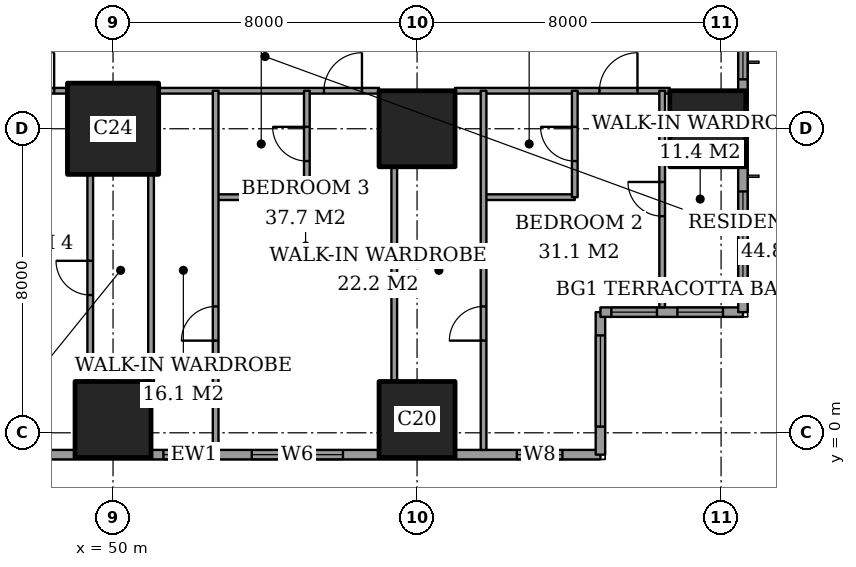
"""IFC4 building model, lengths in metres.
Left out: names, types, materials, properties, quantities, classifications, styles, units other than length and angle.
Written with IfcOpenShell. Run it as: python <this file> out.ifc"""

import sys

from ifc_helpers import new_model, si_unit, direction, frame, frame_2d, origin, origin_2d, place, context, subcontext, project, spatial, rectangle, extrude, element, fill, save


model = new_model("IFC4")
c1 = context("Model", 3, precision=1e-05, world=origin(), true_north=direction((0.0, 1.0)))
c2 = subcontext(c1, "Body", "Model", "MODEL_VIEW")
j1 = project(units=[si_unit("LENGTHUNIT", "METRE"), si_unit("PLANEANGLEUNIT", "RADIAN")], contexts=[c1])
p1 = place(None, origin())
s1 = spatial("IfcSite", under=j1, at=p1, CompositionType="ELEMENT")
p2 = place(p1, origin())
s2 = spatial("IfcBuilding", under=s1, at=p2, CompositionType="ELEMENT")
p3 = place(p2, frame((0.0, 0.0, 51.2)))
s3 = spatial("IfcBuildingStorey", under=s2, at=p3, CompositionType="ELEMENT", Elevation=51.2)
p4 = place(p3, frame((50.0, 0.35, 0.0), z_axis=(0.0, 0.0, 1.0), x_axis=(1.0, 0.0, 0.0)))
e1 = element("IfcColumn", 1, at=p4, inside=s3, PredefinedType="COLUMN", context=c2, shape_type="SweptSolid", body=[
    extrude(rectangle(XDim=2.0, YDim=2.0, at=origin_2d()), origin(), (0.0, 0.0, 1.0), 3.6),
])
p5 = place(p3, frame((50.0, 8.0, 0.0), z_axis=(0.0, 0.0, 1.0), x_axis=(1.0, 0.0, 0.0)))
e2 = element("IfcColumn", 2, at=p5, inside=s3, PredefinedType="COLUMN", context=c2, shape_type="SweptSolid", body=[
    extrude(rectangle(XDim=2.4, YDim=2.4, at=origin_2d()), origin(), (0.0, 0.0, 1.0), 3.6),
])
for number, where, z_axis, x_axis in (
    (3, (58.0, 0.35, 0.0), (0.0, 0.0, 1.0), (1.0, 0.0, 0.0)),
    (4, (58.0, 8.0, 0.0), (0.0, 0.0, 1.0), (1.0, 0.0, 0.0)),
    (5, (65.65, 8.0, 0.0), (0.0, 0.0, 1.0), (1.0, 0.0, 0.0)),
):
    element("IfcColumn", number, at=place(p3, frame(where, z_axis=z_axis, x_axis=x_axis)), inside=s3, PredefinedType="COLUMN", context=c2, shape_type="SweptSolid", body=[
        extrude(rectangle(XDim=2.0, YDim=2.0, at=origin_2d()), origin(), (0.0, 0.0, 1.0), 3.6),
    ])
p6 = place(p3, frame((41.425, -0.575, 0.0), z_axis=(0.0, 0.0, 1.0), x_axis=(1.0, 0.0, 0.0)))
e6 = element("IfcWall", 6, at=p6, inside=s3, PredefinedType="SOLIDWALL", context=c2, shape_type="SweptSolid", body=[
    extrude(rectangle(XDim=21.4, YDim=0.25, at=frame_2d((10.7, 0.0))), origin(), (0.0, 0.0, 1.0), 3.6),
])
p7 = place(p6, frame((2.3, 0.0, 0.6)))
e7 = element("IfcOpeningElement", 7, at=p7, cuts=e6, PredefinedType="OPENING", context=c2, shape_type="SweptSolid", body=[
    extrude(rectangle(XDim=1.2, YDim=2.0, at=frame_2d((0.6, 1.0))), frame((0.0, 0.135, 0.0), z_axis=(0.0, -1.0, 0.0), x_axis=(1.0, 0.0, 0.0)), (0.0, 0.0, 1.0), 0.27),
])
p8 = place(p6, frame((4.525, 0.0, 0.6)))
e8 = element("IfcOpeningElement", 8, at=p8, cuts=e6, PredefinedType="OPENING", context=c2, shape_type="SweptSolid", body=[
    extrude(rectangle(XDim=2.4, YDim=2.0, at=frame_2d((1.2, 1.0))), frame((0.0, 0.135, 0.0), z_axis=(0.0, -1.0, 0.0), x_axis=(1.0, 0.0, 0.0)), (0.0, 0.0, 1.0), 0.27),
])
p9 = place(p6, frame((9.9, 0.0, 0.6)))
e9 = element("IfcOpeningElement", 9, at=p9, cuts=e6, PredefinedType="OPENING", context=c2, shape_type="SweptSolid", body=[
    extrude(rectangle(XDim=1.2, YDim=2.0, at=frame_2d((0.6, 1.0))), frame((0.0, 0.135, 0.0), z_axis=(0.0, -1.0, 0.0), x_axis=(1.0, 0.0, 0.0)), (0.0, 0.0, 1.0), 0.27),
])
p10 = place(p6, frame((12.225, 0.0, 0.6)))
e10 = element("IfcOpeningElement", 10, at=p10, cuts=e6, PredefinedType="OPENING", context=c2, shape_type="SweptSolid", body=[
    extrude(rectangle(XDim=2.4, YDim=2.0, at=frame_2d((1.2, 1.0))), frame((0.0, 0.135, 0.0), z_axis=(0.0, -1.0, 0.0), x_axis=(1.0, 0.0, 0.0)), (0.0, 0.0, 1.0), 0.27),
])
p11 = place(p6, frame((19.2, 0.0, 0.6)))
e11 = element("IfcOpeningElement", 11, at=p11, cuts=e6, PredefinedType="OPENING", context=c2, shape_type="SweptSolid", body=[
    extrude(rectangle(XDim=1.2, YDim=2.0, at=frame_2d((0.6, 1.0))), frame((0.0, 0.135, 0.0), z_axis=(0.0, -1.0, 0.0), x_axis=(1.0, 0.0, 0.0)), (0.0, 0.0, 1.0), 0.27),
])
p12 = place(p3, frame((62.825, -0.575, 0.0), z_axis=(0.0, 0.0, 1.0), x_axis=(0.0, 1.0, 0.0)))
e12 = element("IfcWall", 12, at=p12, inside=s3, PredefinedType="SOLIDWALL", context=c2, shape_type="SweptSolid", body=[
    extrude(rectangle(XDim=3.75, YDim=0.25, at=frame_2d((1.875, 0.0))), origin(), (0.0, 0.0, 1.0), 3.6),
])
p13 = place(p12, frame((0.738, 0.0, 0.6)))
e13 = element("IfcOpeningElement", 13, at=p13, cuts=e12, PredefinedType="OPENING", context=c2, shape_type="SweptSolid", body=[
    extrude(rectangle(XDim=2.4, YDim=2.0, at=frame_2d((1.2, 1.0))), frame((0.0, 0.135, 0.0), z_axis=(0.0, -1.0, 0.0), x_axis=(1.0, 0.0, 0.0)), (0.0, 0.0, 1.0), 0.27),
])
p14 = place(p3, frame((62.825, 3.175, 0.0), z_axis=(0.0, 0.0, 1.0), x_axis=(1.0, 0.0, 0.0)))
e14 = element("IfcWall", 14, at=p14, inside=s3, PredefinedType="SOLIDWALL", context=c2, shape_type="SweptSolid", body=[
    extrude(rectangle(XDim=3.75, YDim=0.25, at=frame_2d((1.875, 0.0))), origin(), (0.0, 0.0, 1.0), 3.6),
])
p15 = place(p14, frame((0.288, 0.0, 0.6)))
e15 = element("IfcOpeningElement", 15, at=p15, cuts=e14, PredefinedType="OPENING", context=c2, shape_type="SweptSolid", body=[
    extrude(rectangle(XDim=1.2, YDim=2.0, at=frame_2d((0.6, 1.0))), frame((0.0, 0.135, 0.0), z_axis=(0.0, -1.0, 0.0), x_axis=(1.0, 0.0, 0.0)), (0.0, 0.0, 1.0), 0.27),
])
p16 = place(p14, frame((2.025, 0.0, 0.6)))
e16 = element("IfcOpeningElement", 16, at=p16, cuts=e14, PredefinedType="OPENING", context=c2, shape_type="SweptSolid", body=[
    extrude(rectangle(XDim=1.2, YDim=2.0, at=frame_2d((0.6, 1.0))), frame((0.0, 0.135, 0.0), z_axis=(0.0, -1.0, 0.0), x_axis=(1.0, 0.0, 0.0)), (0.0, 0.0, 1.0), 0.27),
])
p17 = place(p3, frame((66.575, 3.175, 0.0), z_axis=(0.0, 0.0, 1.0), x_axis=(0.0, 1.0, 0.0)))
e17 = element("IfcWall", 17, at=p17, inside=s3, PredefinedType="SOLIDWALL", context=c2, shape_type="SweptSolid", body=[
    extrude(rectangle(XDim=41.65, YDim=0.25, at=frame_2d((20.825, 0.0))), origin(), (0.0, 0.0, 1.0), 3.6),
])
p18 = place(p17, frame((0.775, 0.0, 0.6)))
e18 = element("IfcOpeningElement", 18, at=p18, cuts=e17, PredefinedType="OPENING", context=c2, shape_type="SweptSolid", body=[
    extrude(rectangle(XDim=2.4, YDim=2.0, at=frame_2d((1.2, 1.0))), frame((0.0, 0.135, 0.0), z_axis=(0.0, -1.0, 0.0), x_axis=(1.0, 0.0, 0.0)), (0.0, 0.0, 1.0), 0.27),
])
p19 = place(p17, frame((6.125, 0.0, 0.6)))
e19 = element("IfcOpeningElement", 19, at=p19, cuts=e17, PredefinedType="OPENING", context=c2, shape_type="SweptSolid", body=[
    extrude(rectangle(XDim=1.2, YDim=2.0, at=frame_2d((0.6, 1.0))), frame((0.0, 0.135, 0.0), z_axis=(0.0, -1.0, 0.0), x_axis=(1.0, 0.0, 0.0)), (0.0, 0.0, 1.0), 0.27),
])
p20 = place(p17, frame((8.375, 0.0, 0.6)))
e20 = element("IfcOpeningElement", 20, at=p20, cuts=e17, PredefinedType="OPENING", context=c2, shape_type="SweptSolid", body=[
    extrude(rectangle(XDim=2.4, YDim=2.0, at=frame_2d((1.2, 1.0))), frame((0.0, 0.135, 0.0), z_axis=(0.0, -1.0, 0.0), x_axis=(1.0, 0.0, 0.0)), (0.0, 0.0, 1.0), 0.27),
])
p21 = place(p17, frame((15.775, 0.0, 0.6)))
e21 = element("IfcOpeningElement", 21, at=p21, cuts=e17, PredefinedType="OPENING", context=c2, shape_type="SweptSolid", body=[
    extrude(rectangle(XDim=2.4, YDim=2.0, at=frame_2d((1.2, 1.0))), frame((0.0, 0.135, 0.0), z_axis=(0.0, -1.0, 0.0), x_axis=(1.0, 0.0, 0.0)), (0.0, 0.0, 1.0), 0.27),
])
p22 = place(p17, frame((23.475, 0.0, 0.6)))
e22 = element("IfcOpeningElement", 22, at=p22, cuts=e17, PredefinedType="OPENING", context=c2, shape_type="SweptSolid", body=[
    extrude(rectangle(XDim=2.4, YDim=2.0, at=frame_2d((1.2, 1.0))), frame((0.0, 0.135, 0.0), z_axis=(0.0, -1.0, 0.0), x_axis=(1.0, 0.0, 0.0)), (0.0, 0.0, 1.0), 0.27),
])
p23 = place(p17, frame((30.775, 0.0, 0.6)))
e23 = element("IfcOpeningElement", 23, at=p23, cuts=e17, PredefinedType="OPENING", context=c2, shape_type="SweptSolid", body=[
    extrude(rectangle(XDim=2.4, YDim=2.0, at=frame_2d((1.2, 1.0))), frame((0.0, 0.135, 0.0), z_axis=(0.0, -1.0, 0.0), x_axis=(1.0, 0.0, 0.0)), (0.0, 0.0, 1.0), 0.27),
])
p24 = place(p17, frame((34.125, 0.0, 0.6)))
e24 = element("IfcOpeningElement", 24, at=p24, cuts=e17, PredefinedType="OPENING", context=c2, shape_type="SweptSolid", body=[
    extrude(rectangle(XDim=1.2, YDim=2.0, at=frame_2d((0.6, 1.0))), frame((0.0, 0.135, 0.0), z_axis=(0.0, -1.0, 0.0), x_axis=(1.0, 0.0, 0.0)), (0.0, 0.0, 1.0), 0.27),
])
p25 = place(p17, frame((38.475, 0.0, 0.6)))
e25 = element("IfcOpeningElement", 25, at=p25, cuts=e17, PredefinedType="OPENING", context=c2, shape_type="SweptSolid", body=[
    extrude(rectangle(XDim=2.4, YDim=2.0, at=frame_2d((1.2, 1.0))), frame((0.0, 0.135, 0.0), z_axis=(0.0, -1.0, 0.0), x_axis=(1.0, 0.0, 0.0)), (0.0, 0.0, 1.0), 0.27),
])
p26 = place(p3, frame((52.7, 6.2, 0.0), z_axis=(0.0, 0.0, 1.0), x_axis=(1.0, 0.0, 0.0)))
e26 = element("IfcWall", 26, at=p26, inside=s3, PredefinedType="PARTITIONING", context=c2, shape_type="SweptSolid", body=[
    extrude(rectangle(XDim=2.4, YDim=0.15, at=frame_2d((1.2, 0.0))), origin(), (0.0, 0.0, 1.0), 3.35),
])
p27 = place(p3, frame((59.75, 6.2, 0.0), z_axis=(0.0, 0.0, 1.0), x_axis=(1.0, 0.0, 0.0)))
e27 = element("IfcWall", 27, at=p27, inside=s3, PredefinedType="PARTITIONING", context=c2, shape_type="SweptSolid", body=[
    extrude(rectangle(XDim=2.4, YDim=0.15, at=frame_2d((1.2, 0.0))), origin(), (0.0, 0.0, 1.0), 3.35),
])
p28 = place(p3, frame((43.35, 9.0, 0.0), z_axis=(0.0, 0.0, 1.0), x_axis=(1.0, 0.0, 0.0)))
e28 = element("IfcWall", 28, at=p28, inside=s3, PredefinedType="PARTITIONING", context=c2, shape_type="SweptSolid", body=[
    extrude(rectangle(XDim=5.45, YDim=0.15, at=frame_2d((2.725, 0.0))), origin(), (0.0, 0.0, 1.0), 3.35),
])
p29 = place(p28, frame((4.1, 0.0, 0.0)))
e29 = element("IfcOpeningElement", 29, at=p29, cuts=e28, PredefinedType="OPENING", context=c2, shape_type="SweptSolid", body=[
    extrude(rectangle(XDim=1.0, YDim=2.1, at=frame_2d((0.5, 1.05))), frame((0.0, 0.085, 0.0), z_axis=(0.0, -1.0, 0.0), x_axis=(1.0, 0.0, 0.0)), (0.0, 0.0, 1.0), 0.17),
])
p30 = place(p28, frame((0.475, 0.0, 0.0)))
e30 = element("IfcOpeningElement", 30, at=p30, cuts=e28, PredefinedType="OPENING", context=c2, shape_type="SweptSolid", body=[
    extrude(rectangle(XDim=1.0, YDim=2.1, at=frame_2d((0.5, 1.05))), frame((0.0, 0.085, 0.0), z_axis=(0.0, -1.0, 0.0), x_axis=(1.0, 0.0, 0.0)), (0.0, 0.0, 1.0), 0.17),
])
p31 = place(p3, frame((51.2, 9.0, 0.0), z_axis=(0.0, 0.0, 1.0), x_axis=(1.0, 0.0, 0.0)))
e31 = element("IfcWall", 31, at=p31, inside=s3, PredefinedType="PARTITIONING", context=c2, shape_type="SweptSolid", body=[
    extrude(rectangle(XDim=5.8, YDim=0.15, at=frame_2d((2.9, 0.0))), origin(), (0.0, 0.0, 1.0), 3.35),
])
p32 = place(p31, frame((4.35, 0.0, 0.0)))
e32 = element("IfcOpeningElement", 32, at=p32, cuts=e31, PredefinedType="OPENING", context=c2, shape_type="SweptSolid", body=[
    extrude(rectangle(XDim=1.0, YDim=2.1, at=frame_2d((0.5, 1.05))), frame((0.0, 0.085, 0.0), z_axis=(0.0, -1.0, 0.0), x_axis=(1.0, 0.0, 0.0)), (0.0, 0.0, 1.0), 0.17),
])
p33 = place(p3, frame((59.0, 9.0, 0.0), z_axis=(0.0, 0.0, 1.0), x_axis=(1.0, 0.0, 0.0)))
e33 = element("IfcWall", 33, at=p33, inside=s3, PredefinedType="PARTITIONING", context=c2, shape_type="SweptSolid", body=[
    extrude(rectangle(XDim=5.65, YDim=0.15, at=frame_2d((2.825, 0.0))), origin(), (0.0, 0.0, 1.0), 3.35),
])
p34 = place(p33, frame((3.8, 0.0, 0.0)))
e34 = element("IfcOpeningElement", 34, at=p34, cuts=e33, PredefinedType="OPENING", context=c2, shape_type="SweptSolid", body=[
    extrude(rectangle(XDim=1.0, YDim=2.1, at=frame_2d((0.5, 1.05))), frame((0.0, 0.085, 0.0), z_axis=(0.0, -1.0, 0.0), x_axis=(1.0, 0.0, 0.0)), (0.0, 0.0, 1.0), 0.17),
])
p35 = place(p3, frame((49.4, 1.35, 0.0), z_axis=(0.0, 0.0, 1.0), x_axis=(0.0, 1.0, 0.0)))
e35 = element("IfcWall", 35, at=p35, inside=s3, PredefinedType="PARTITIONING", context=c2, shape_type="SweptSolid", body=[
    extrude(rectangle(XDim=5.45, YDim=0.15, at=frame_2d((2.725, 0.0))), origin(), (0.0, 0.0, 1.0), 3.35),
])
p36 = place(p35, frame((2.275, 0.0, 0.0)))
e36 = element("IfcOpeningElement", 36, at=p36, cuts=e35, PredefinedType="OPENING", context=c2, shape_type="SweptSolid", body=[
    extrude(rectangle(XDim=0.9, YDim=2.1, at=frame_2d((0.45, 1.05))), frame((0.0, 0.085, 0.0), z_axis=(0.0, -1.0, 0.0), x_axis=(1.0, 0.0, 0.0)), (0.0, 0.0, 1.0), 0.17),
])
p37 = place(p3, frame((51.0, 1.35, 0.0), z_axis=(0.0, 0.0, 1.0), x_axis=(0.0, 1.0, 0.0)))
e37 = element("IfcWall", 37, at=p37, inside=s3, PredefinedType="PARTITIONING", context=c2, shape_type="SweptSolid", body=[
    extrude(rectangle(XDim=5.45, YDim=0.15, at=frame_2d((2.725, 0.0))), origin(), (0.0, 0.0, 1.0), 3.35),
])
p38 = place(p3, frame((52.7, -0.45, 0.0), z_axis=(0.0, 0.0, 1.0), x_axis=(0.0, 1.0, 0.0)))
e38 = element("IfcWall", 38, at=p38, inside=s3, PredefinedType="PARTITIONING", context=c2, shape_type="SweptSolid", body=[
    extrude(rectangle(XDim=9.45, YDim=0.15, at=frame_2d((4.725, 0.0))), origin(), (0.0, 0.0, 1.0), 3.35),
])
p39 = place(p38, frame((2.875, 0.0, 0.0)))
e39 = element("IfcOpeningElement", 39, at=p39, cuts=e38, PredefinedType="OPENING", context=c2, shape_type="SweptSolid", body=[
    extrude(rectangle(XDim=0.9, YDim=2.1, at=frame_2d((0.45, 1.05))), frame((0.0, 0.085, 0.0), z_axis=(0.0, -1.0, 0.0), x_axis=(1.0, 0.0, 0.0)), (0.0, 0.0, 1.0), 0.17),
])
p40 = place(p3, frame((55.1, 6.2, 0.0), z_axis=(0.0, 0.0, 1.0), x_axis=(0.0, 1.0, 0.0)))
e40 = element("IfcWall", 40, at=p40, inside=s3, PredefinedType="PARTITIONING", context=c2, shape_type="SweptSolid", body=[
    extrude(rectangle(XDim=2.8, YDim=0.15, at=frame_2d((1.4, 0.0))), origin(), (0.0, 0.0, 1.0), 3.35),
])
p41 = place(p40, frame((0.95, 0.0, 0.0)))
e41 = element("IfcOpeningElement", 41, at=p41, cuts=e40, PredefinedType="OPENING", context=c2, shape_type="SweptSolid", body=[
    extrude(rectangle(XDim=0.9, YDim=2.1, at=frame_2d((0.45, 1.05))), frame((0.0, 0.085, 0.0), z_axis=(0.0, -1.0, 0.0), x_axis=(1.0, 0.0, 0.0)), (0.0, 0.0, 1.0), 0.17),
])
p42 = place(p3, frame((57.4, 1.35, 0.0), z_axis=(0.0, 0.0, 1.0), x_axis=(0.0, 1.0, 0.0)))
e42 = element("IfcWall", 42, at=p42, inside=s3, PredefinedType="PARTITIONING", context=c2, shape_type="SweptSolid", body=[
    extrude(rectangle(XDim=5.65, YDim=0.15, at=frame_2d((2.825, 0.0))), origin(), (0.0, 0.0, 1.0), 3.35),
])
p43 = place(p3, frame((59.75, -0.45, 0.0), z_axis=(0.0, 0.0, 1.0), x_axis=(0.0, 1.0, 0.0)))
e43 = element("IfcWall", 43, at=p43, inside=s3, PredefinedType="PARTITIONING", context=c2, shape_type="SweptSolid", body=[
    extrude(rectangle(XDim=9.45, YDim=0.15, at=frame_2d((4.725, 0.0))), origin(), (0.0, 0.0, 1.0), 3.35),
])
p44 = place(p43, frame((2.875, 0.0, 0.0)))
e44 = element("IfcOpeningElement", 44, at=p44, cuts=e43, PredefinedType="OPENING", context=c2, shape_type="SweptSolid", body=[
    extrude(rectangle(XDim=0.9, YDim=2.1, at=frame_2d((0.45, 1.05))), frame((0.0, 0.085, 0.0), z_axis=(0.0, -1.0, 0.0), x_axis=(1.0, 0.0, 0.0)), (0.0, 0.0, 1.0), 0.17),
])
p45 = place(p3, frame((62.15, 6.2, 0.0), z_axis=(0.0, 0.0, 1.0), x_axis=(0.0, 1.0, 0.0)))
e45 = element("IfcWall", 45, at=p45, inside=s3, PredefinedType="PARTITIONING", context=c2, shape_type="SweptSolid", body=[
    extrude(rectangle(XDim=2.8, YDim=0.15, at=frame_2d((1.4, 0.0))), origin(), (0.0, 0.0, 1.0), 3.35),
])
p46 = place(p45, frame((0.95, 0.0, 0.0)))
e46 = element("IfcOpeningElement", 46, at=p46, cuts=e45, PredefinedType="OPENING", context=c2, shape_type="SweptSolid", body=[
    extrude(rectangle(XDim=0.9, YDim=2.1, at=frame_2d((0.45, 1.05))), frame((0.0, 0.085, 0.0), z_axis=(0.0, -1.0, 0.0), x_axis=(1.0, 0.0, 0.0)), (0.0, 0.0, 1.0), 0.17),
])
p47 = place(p3, frame((64.45, 3.3, 0.0), z_axis=(0.0, 0.0, 1.0), x_axis=(0.0, 1.0, 0.0)))
e47 = element("IfcWall", 47, at=p47, inside=s3, PredefinedType="PARTITIONING", context=c2, shape_type="SweptSolid", body=[
    extrude(rectangle(XDim=5.7, YDim=0.15, at=frame_2d((2.85, 0.0))), origin(), (0.0, 0.0, 1.0), 3.35),
])
p48 = place(p47, frame((2.4, 0.0, 0.0)))
e48 = element("IfcOpeningElement", 48, at=p48, cuts=e47, PredefinedType="OPENING", context=c2, shape_type="SweptSolid", body=[
    extrude(rectangle(XDim=0.9, YDim=2.1, at=frame_2d((0.45, 1.05))), frame((0.0, 0.085, 0.0), z_axis=(0.0, -1.0, 0.0), x_axis=(1.0, 0.0, 0.0)), (0.0, 0.0, 1.0), 0.17),
])
p49 = place(p9, origin())
e49 = element("IfcWindow", 49, at=p49, inside=s3, PartitioningType="SINGLE_PANEL", PredefinedType="WINDOW", context=c2, shape_type="SweptSolid", body=[
    extrude(rectangle(XDim=1.2, YDim=2.0, at=frame_2d((0.6, 1.0))), frame((0.0, 0.03, 0.0), z_axis=(0.0, -1.0, 0.0), x_axis=(1.0, 0.0, 0.0)), (0.0, 0.0, 1.0), 0.06),
])
fill(e9, e49)
p50 = place(p10, origin())
e50 = element("IfcWindow", 50, at=p50, inside=s3, PartitioningType="SINGLE_PANEL", PredefinedType="WINDOW", context=c2, shape_type="SweptSolid", body=[
    extrude(rectangle(XDim=2.4, YDim=2.0, at=frame_2d((1.2, 1.0))), frame((0.0, 0.03, 0.0), z_axis=(0.0, -1.0, 0.0), x_axis=(1.0, 0.0, 0.0)), (0.0, 0.0, 1.0), 0.06),
])
fill(e10, e50)
p51 = place(p11, origin())
e51 = element("IfcWindow", 51, at=p51, inside=s3, PartitioningType="SINGLE_PANEL", PredefinedType="WINDOW", context=c2, shape_type="SweptSolid", body=[
    extrude(rectangle(XDim=1.2, YDim=2.0, at=frame_2d((0.6, 1.0))), frame((0.0, 0.03, 0.0), z_axis=(0.0, -1.0, 0.0), x_axis=(1.0, 0.0, 0.0)), (0.0, 0.0, 1.0), 0.06),
])
fill(e11, e51)
p52 = place(p13, origin())
e52 = element("IfcWindow", 52, at=p52, inside=s3, PartitioningType="SINGLE_PANEL", PredefinedType="WINDOW", context=c2, shape_type="SweptSolid", body=[
    extrude(rectangle(XDim=2.4, YDim=2.0, at=frame_2d((1.2, 1.0))), frame((0.0, 0.03, 0.0), z_axis=(0.0, -1.0, 0.0), x_axis=(1.0, 0.0, 0.0)), (0.0, 0.0, 1.0), 0.06),
])
fill(e13, e52)
p53 = place(p15, origin())
e53 = element("IfcWindow", 53, at=p53, inside=s3, PartitioningType="SINGLE_PANEL", PredefinedType="WINDOW", context=c2, shape_type="SweptSolid", body=[
    extrude(rectangle(XDim=1.2, YDim=2.0, at=frame_2d((0.6, 1.0))), frame((0.0, 0.03, 0.0), z_axis=(0.0, -1.0, 0.0), x_axis=(1.0, 0.0, 0.0)), (0.0, 0.0, 1.0), 0.06),
])
fill(e15, e53)
p54 = place(p16, origin())
e54 = element("IfcWindow", 54, at=p54, inside=s3, PartitioningType="SINGLE_PANEL", PredefinedType="WINDOW", context=c2, shape_type="SweptSolid", body=[
    extrude(rectangle(XDim=1.2, YDim=2.0, at=frame_2d((0.6, 1.0))), frame((0.0, 0.03, 0.0), z_axis=(0.0, -1.0, 0.0), x_axis=(1.0, 0.0, 0.0)), (0.0, 0.0, 1.0), 0.06),
])
fill(e16, e54)
p55 = place(p18, origin())
e55 = element("IfcWindow", 55, at=p55, inside=s3, PartitioningType="SINGLE_PANEL", PredefinedType="WINDOW", context=c2, shape_type="SweptSolid", body=[
    extrude(rectangle(XDim=2.4, YDim=2.0, at=frame_2d((1.2, 1.0))), frame((0.0, 0.03, 0.0), z_axis=(0.0, -1.0, 0.0), x_axis=(1.0, 0.0, 0.0)), (0.0, 0.0, 1.0), 0.06),
])
fill(e18, e55)
p56 = place(p19, origin())
e56 = element("IfcWindow", 56, at=p56, inside=s3, PartitioningType="SINGLE_PANEL", PredefinedType="WINDOW", context=c2, shape_type="SweptSolid", body=[
    extrude(rectangle(XDim=1.2, YDim=2.0, at=frame_2d((0.6, 1.0))), frame((0.0, 0.03, 0.0), z_axis=(0.0, -1.0, 0.0), x_axis=(1.0, 0.0, 0.0)), (0.0, 0.0, 1.0), 0.06),
])
fill(e19, e56)
p57 = place(p48, origin())
e57 = element("IfcDoor", 57, at=p57, inside=s3, OperationType="SINGLE_SWING_LEFT", PredefinedType="DOOR", context=c2, shape_type="SweptSolid", body=[
    extrude(rectangle(XDim=0.9, YDim=2.1, at=frame_2d((0.45, 1.05))), frame((0.0, 0.025, 0.0), z_axis=(0.0, -1.0, 0.0), x_axis=(1.0, 0.0, 0.0)), (0.0, 0.0, 1.0), 0.05),
])
fill(e48, e57)
p58 = place(p46, origin())
e58 = element("IfcDoor", 58, at=p58, inside=s3, OperationType="SINGLE_SWING_LEFT", PredefinedType="DOOR", context=c2, shape_type="SweptSolid", body=[
    extrude(rectangle(XDim=0.9, YDim=2.1, at=frame_2d((0.45, 1.05))), frame((0.0, 0.025, 0.0), z_axis=(0.0, -1.0, 0.0), x_axis=(1.0, 0.0, 0.0)), (0.0, 0.0, 1.0), 0.05),
])
fill(e46, e58)
p59 = place(p34, origin())
e59 = element("IfcDoor", 59, at=p59, inside=s3, OperationType="SINGLE_SWING_LEFT", PredefinedType="DOOR", context=c2, shape_type="SweptSolid", body=[
    extrude(rectangle(XDim=1.0, YDim=2.1, at=frame_2d((0.5, 1.05))), frame((0.0, 0.025, 0.0), z_axis=(0.0, -1.0, 0.0), x_axis=(1.0, 0.0, 0.0)), (0.0, 0.0, 1.0), 0.05),
])
fill(e34, e59)
p60 = place(p44, origin())
e60 = element("IfcDoor", 60, at=p60, inside=s3, OperationType="SINGLE_SWING_RIGHT", PredefinedType="DOOR", context=c2, shape_type="SweptSolid", body=[
    extrude(rectangle(XDim=0.9, YDim=2.1, at=frame_2d((0.45, 1.05))), frame((0.0, 0.025, 0.0), z_axis=(0.0, -1.0, 0.0), x_axis=(1.0, 0.0, 0.0)), (0.0, 0.0, 1.0), 0.05),
])
fill(e44, e60)
p61 = place(p41, origin())
e61 = element("IfcDoor", 61, at=p61, inside=s3, OperationType="SINGLE_SWING_LEFT", PredefinedType="DOOR", context=c2, shape_type="SweptSolid", body=[
    extrude(rectangle(XDim=0.9, YDim=2.1, at=frame_2d((0.45, 1.05))), frame((0.0, 0.025, 0.0), z_axis=(0.0, -1.0, 0.0), x_axis=(1.0, 0.0, 0.0)), (0.0, 0.0, 1.0), 0.05),
])
fill(e41, e61)
p62 = place(p32, origin())
e62 = element("IfcDoor", 62, at=p62, inside=s3, OperationType="SINGLE_SWING_LEFT", PredefinedType="DOOR", context=c2, shape_type="SweptSolid", body=[
    extrude(rectangle(XDim=1.0, YDim=2.1, at=frame_2d((0.5, 1.05))), frame((0.0, 0.025, 0.0), z_axis=(0.0, -1.0, 0.0), x_axis=(1.0, 0.0, 0.0)), (0.0, 0.0, 1.0), 0.05),
])
fill(e32, e62)
p63 = place(p39, origin())
e63 = element("IfcDoor", 63, at=p63, inside=s3, OperationType="SINGLE_SWING_RIGHT", PredefinedType="DOOR", context=c2, shape_type="SweptSolid", body=[
    extrude(rectangle(XDim=0.9, YDim=2.1, at=frame_2d((0.45, 1.05))), frame((0.0, 0.025, 0.0), z_axis=(0.0, -1.0, 0.0), x_axis=(1.0, 0.0, 0.0)), (0.0, 0.0, 1.0), 0.05),
])
fill(e39, e63)
p64 = place(p36, origin())
e64 = element("IfcDoor", 64, at=p64, inside=s3, OperationType="SINGLE_SWING_LEFT", PredefinedType="DOOR", context=c2, shape_type="SweptSolid", body=[
    extrude(rectangle(XDim=0.9, YDim=2.1, at=frame_2d((0.45, 1.05))), frame((0.0, 0.025, 0.0), z_axis=(0.0, -1.0, 0.0), x_axis=(1.0, 0.0, 0.0)), (0.0, 0.0, 1.0), 0.05),
])
fill(e36, e64)
p65 = place(p29, origin())
e65 = element("IfcDoor", 65, at=p65, inside=s3, OperationType="SINGLE_SWING_LEFT", PredefinedType="DOOR", context=c2, shape_type="SweptSolid", body=[
    extrude(rectangle(XDim=1.0, YDim=2.1, at=frame_2d((0.5, 1.05))), frame((0.0, 0.025, 0.0), z_axis=(0.0, -1.0, 0.0), x_axis=(1.0, 0.0, 0.0)), (0.0, 0.0, 1.0), 0.05),
])
fill(e29, e65)
save(model, sys.argv[1])
